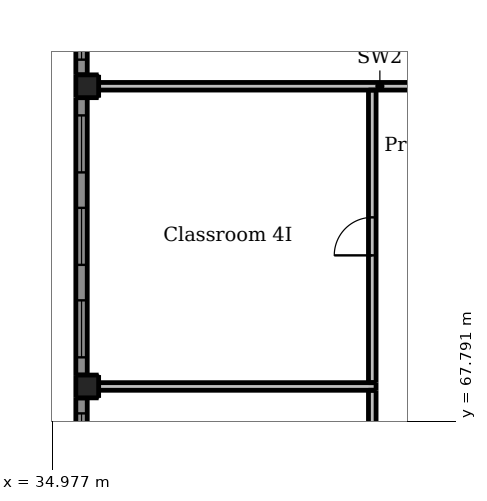
"""IFC4 building model, lengths in metres.
Left out: names, types, materials, properties, quantities, classifications, styles, units other than length and angle.
Written with IfcOpenShell. Run it as: python <this file> out.ifc"""

import sys

from ifc_helpers import new_model, si_unit, direction, frame, frame_2d, origin, origin_2d, place, context, subcontext, project, spatial, rectangle, extrude, element, fill, save


model = new_model("IFC4")
c1 = context("Model", 3, precision=1e-05, world=origin(), true_north=direction((0.0, 1.0)))
c2 = subcontext(c1, "Body", "Model", "MODEL_VIEW")
j1 = project(units=[si_unit("LENGTHUNIT", "METRE"), si_unit("PLANEANGLEUNIT", "RADIAN")], contexts=[c1])
p1 = place(None, origin())
s1 = spatial("IfcSite", under=j1, at=p1, CompositionType="ELEMENT")
p2 = place(p1, origin())
s2 = spatial("IfcBuilding", under=s1, at=p2, CompositionType="ELEMENT")
p3 = place(p2, frame((0.0, 0.0, 19.0)))
s3 = spatial("IfcBuildingStorey", under=s2, at=p3, CompositionType="ELEMENT", Elevation=19.0)
for number, where, z_axis, x_axis in (
    (1, (35.9, 68.7, -0.3), (0.0, 0.0, 1.0), (1.0, 0.0, 0.0)),
    (2, (35.9, 76.6, -0.3), (0.0, 0.0, 1.0), (1.0, 0.0, 0.0)),
):
    element("IfcColumn", number, at=place(p3, frame(where, z_axis=z_axis, x_axis=x_axis)), inside=s3, PredefinedType="COLUMN", context=c2, shape_type="SweptSolid", body=[
        extrude(rectangle(XDim=0.6, YDim=0.6, at=origin_2d()), origin(), (0.0, 0.0, 1.0), 4.35),
    ])
p4 = place(p3, frame((35.75, 61.45, 0.0), z_axis=(0.0, 0.0, 1.0), x_axis=(0.0, 1.0, 0.0)))
e3 = element("IfcWall", 3, at=p4, inside=s3, PredefinedType="SOLIDWALL", context=c2, shape_type="SweptSolid", body=[
    extrude(rectangle(XDim=6.95, YDim=0.3, at=frame_2d((3.475, 0.0))), origin(), (0.0, 0.0, 1.0), 3.15),
])
p5 = place(p4, frame((0.408, 0.0, 0.9)))
e4 = element("IfcOpeningElement", 4, at=p5, cuts=e3, PredefinedType="OPENING", context=c2, shape_type="SweptSolid", body=[
    extrude(rectangle(XDim=1.5, YDim=1.5, at=frame_2d((0.75, 0.75))), frame((0.0, 0.16, 0.0), z_axis=(0.0, -1.0, 0.0), x_axis=(1.0, 0.0, 0.0)), (0.0, 0.0, 1.0), 0.32),
])
p6 = place(p4, frame((2.725, 0.0, 0.9)))
e5 = element("IfcOpeningElement", 5, at=p6, cuts=e3, PredefinedType="OPENING", context=c2, shape_type="SweptSolid", body=[
    extrude(rectangle(XDim=1.5, YDim=1.5, at=frame_2d((0.75, 0.75))), frame((0.0, 0.16, 0.0), z_axis=(0.0, -1.0, 0.0), x_axis=(1.0, 0.0, 0.0)), (0.0, 0.0, 1.0), 0.32),
])
p7 = place(p4, frame((5.042, 0.0, 0.9)))
e6 = element("IfcOpeningElement", 6, at=p7, cuts=e3, PredefinedType="OPENING", context=c2, shape_type="SweptSolid", body=[
    extrude(rectangle(XDim=1.5, YDim=1.5, at=frame_2d((0.75, 0.75))), frame((0.0, 0.16, 0.0), z_axis=(0.0, -1.0, 0.0), x_axis=(1.0, 0.0, 0.0)), (0.0, 0.0, 1.0), 0.32),
])
p8 = place(p3, frame((35.75, 69.0, 0.0), z_axis=(0.0, 0.0, 1.0), x_axis=(0.0, 1.0, 0.0)))
e7 = element("IfcWall", 7, at=p8, inside=s3, PredefinedType="SOLIDWALL", context=c2, shape_type="SweptSolid", body=[
    extrude(rectangle(XDim=7.3, YDim=0.3, at=frame_2d((3.65, 0.0))), origin(), (0.0, 0.0, 1.0), 3.15),
])
p9 = place(p8, frame((0.467, 0.0, 0.9)))
e8 = element("IfcOpeningElement", 8, at=p9, cuts=e7, PredefinedType="OPENING", context=c2, shape_type="SweptSolid", body=[
    extrude(rectangle(XDim=1.5, YDim=1.5, at=frame_2d((0.75, 0.75))), frame((0.0, 0.16, 0.0), z_axis=(0.0, -1.0, 0.0), x_axis=(1.0, 0.0, 0.0)), (0.0, 0.0, 1.0), 0.32),
])
p10 = place(p8, frame((2.9, 0.0, 0.9)))
e9 = element("IfcOpeningElement", 9, at=p10, cuts=e7, PredefinedType="OPENING", context=c2, shape_type="SweptSolid", body=[
    extrude(rectangle(XDim=1.5, YDim=1.5, at=frame_2d((0.75, 0.75))), frame((0.0, 0.16, 0.0), z_axis=(0.0, -1.0, 0.0), x_axis=(1.0, 0.0, 0.0)), (0.0, 0.0, 1.0), 0.32),
])
p11 = place(p8, frame((5.333, 0.0, 0.9)))
e10 = element("IfcOpeningElement", 10, at=p11, cuts=e7, PredefinedType="OPENING", context=c2, shape_type="SweptSolid", body=[
    extrude(rectangle(XDim=1.5, YDim=1.5, at=frame_2d((0.75, 0.75))), frame((0.0, 0.16, 0.0), z_axis=(0.0, -1.0, 0.0), x_axis=(1.0, 0.0, 0.0)), (0.0, 0.0, 1.0), 0.32),
])
p12 = place(p3, frame((35.75, 76.9, 0.0), z_axis=(0.0, 0.0, 1.0), x_axis=(0.0, 1.0, 0.0)))
e11 = element("IfcWall", 11, at=p12, inside=s3, PredefinedType="SOLIDWALL", context=c2, shape_type="SweptSolid", body=[
    extrude(rectangle(XDim=6.9, YDim=0.3, at=frame_2d((3.45, 0.0))), origin(), (0.0, 0.0, 1.0), 3.15),
])
p13 = place(p12, frame((0.4, 0.0, 0.9)))
e12 = element("IfcOpeningElement", 12, at=p13, cuts=e11, PredefinedType="OPENING", context=c2, shape_type="SweptSolid", body=[
    extrude(rectangle(XDim=1.5, YDim=1.5, at=frame_2d((0.75, 0.75))), frame((0.0, 0.16, 0.0), z_axis=(0.0, -1.0, 0.0), x_axis=(1.0, 0.0, 0.0)), (0.0, 0.0, 1.0), 0.32),
])
p14 = place(p12, frame((2.7, 0.0, 0.9)))
e13 = element("IfcOpeningElement", 13, at=p14, cuts=e11, PredefinedType="OPENING", context=c2, shape_type="SweptSolid", body=[
    extrude(rectangle(XDim=1.5, YDim=1.5, at=frame_2d((0.75, 0.75))), frame((0.0, 0.16, 0.0), z_axis=(0.0, -1.0, 0.0), x_axis=(1.0, 0.0, 0.0)), (0.0, 0.0, 1.0), 0.32),
])
p15 = place(p12, frame((5.0, 0.0, 0.9)))
e14 = element("IfcOpeningElement", 14, at=p15, cuts=e11, PredefinedType="OPENING", context=c2, shape_type="SweptSolid", body=[
    extrude(rectangle(XDim=1.5, YDim=1.5, at=frame_2d((0.75, 0.75))), frame((0.0, 0.16, 0.0), z_axis=(0.0, -1.0, 0.0), x_axis=(1.0, 0.0, 0.0)), (0.0, 0.0, 1.0), 0.32),
])
p16 = place(p3, frame((43.4, 61.25, 0.0), z_axis=(0.0, 0.0, 1.0), x_axis=(0.0, 1.0, 0.0)))
e15 = element("IfcWall", 15, at=p16, inside=s3, PredefinedType="PARTITIONING", context=c2, shape_type="SweptSolid", body=[
    extrude(rectangle(XDim=7.35, YDim=0.2, at=frame_2d((3.675, 0.0))), origin(), (0.0, 0.0, 1.0), 2.85),
])
p17 = place(p16, frame((3.175, 0.0, 0.0)))
e16 = element("IfcOpeningElement", 16, at=p17, cuts=e15, PredefinedType="OPENING", context=c2, shape_type="SweptSolid", body=[
    extrude(rectangle(XDim=1.0, YDim=2.1, at=frame_2d((0.5, 1.05))), frame((0.0, 0.11, 0.0), z_axis=(0.0, -1.0, 0.0), x_axis=(1.0, 0.0, 0.0)), (0.0, 0.0, 1.0), 0.22),
])
p18 = place(p3, frame((43.4, 68.8, 0.0), z_axis=(0.0, 0.0, 1.0), x_axis=(0.0, 1.0, 0.0)))
e17 = element("IfcWall", 17, at=p18, inside=s3, PredefinedType="PARTITIONING", context=c2, shape_type="SweptSolid", body=[
    extrude(rectangle(XDim=7.7, YDim=0.2, at=frame_2d((3.85, 0.0))), origin(), (0.0, 0.0, 1.0), 2.85),
])
p19 = place(p18, frame((3.35, 0.0, 0.0)))
e18 = element("IfcOpeningElement", 18, at=p19, cuts=e17, PredefinedType="OPENING", context=c2, shape_type="SweptSolid", body=[
    extrude(rectangle(XDim=1.0, YDim=2.1, at=frame_2d((0.5, 1.05))), frame((0.0, 0.11, 0.0), z_axis=(0.0, -1.0, 0.0), x_axis=(1.0, 0.0, 0.0)), (0.0, 0.0, 1.0), 0.22),
])
p20 = place(p3, frame((36.2, 68.7, 0.0), z_axis=(0.0, 0.0, 1.0), x_axis=(1.0, 0.0, 0.0)))
e19 = element("IfcWall", 19, at=p20, inside=s3, PredefinedType="PARTITIONING", context=c2, shape_type="SweptSolid", body=[
    extrude(rectangle(XDim=7.3, YDim=0.2, at=frame_2d((3.65, 0.0))), origin(), (0.0, 0.0, 1.0), 2.85),
])
p21 = place(p3, frame((36.2, 76.6, 0.0), z_axis=(0.0, 0.0, 1.0), x_axis=(1.0, 0.0, 0.0)))
e20 = element("IfcWall", 20, at=p21, inside=s3, PredefinedType="PARTITIONING", context=c2, shape_type="SweptSolid", body=[
    extrude(rectangle(XDim=14.8, YDim=0.2, at=frame_2d((7.4, 0.0))), origin(), (0.0, 0.0, 1.0), 2.85),
])
p22 = place(p21, frame((11.1, 0.0, 0.0)))
e21 = element("IfcOpeningElement", 21, at=p22, cuts=e20, PredefinedType="OPENING", context=c2, shape_type="SweptSolid", body=[
    extrude(rectangle(XDim=1.0, YDim=2.1, at=frame_2d((0.5, 1.05))), frame((0.0, 0.11, 0.0), z_axis=(0.0, -1.0, 0.0), x_axis=(1.0, 0.0, 0.0)), (0.0, 0.0, 1.0), 0.22),
])
p23 = place(p7, origin())
e22 = element("IfcWindow", 22, at=p23, inside=s3, PartitioningType="DOUBLE_PANEL_HORIZONTAL", PredefinedType="WINDOW", context=c2, shape_type="SweptSolid", body=[
    extrude(rectangle(XDim=1.5, YDim=1.5, at=frame_2d((0.75, 0.75))), frame((0.0, 0.03, 0.0), z_axis=(0.0, -1.0, 0.0), x_axis=(1.0, 0.0, 0.0)), (0.0, 0.0, 1.0), 0.06),
])
fill(e6, e22)
p24 = place(p9, origin())
e23 = element("IfcWindow", 23, at=p24, inside=s3, PartitioningType="DOUBLE_PANEL_HORIZONTAL", PredefinedType="WINDOW", context=c2, shape_type="SweptSolid", body=[
    extrude(rectangle(XDim=1.5, YDim=1.5, at=frame_2d((0.75, 0.75))), frame((0.0, 0.03, 0.0), z_axis=(0.0, -1.0, 0.0), x_axis=(1.0, 0.0, 0.0)), (0.0, 0.0, 1.0), 0.06),
])
fill(e8, e23)
p25 = place(p10, origin())
e24 = element("IfcWindow", 24, at=p25, inside=s3, PartitioningType="DOUBLE_PANEL_HORIZONTAL", PredefinedType="WINDOW", context=c2, shape_type="SweptSolid", body=[
    extrude(rectangle(XDim=1.5, YDim=1.5, at=frame_2d((0.75, 0.75))), frame((0.0, 0.03, 0.0), z_axis=(0.0, -1.0, 0.0), x_axis=(1.0, 0.0, 0.0)), (0.0, 0.0, 1.0), 0.06),
])
fill(e9, e24)
p26 = place(p11, origin())
e25 = element("IfcWindow", 25, at=p26, inside=s3, PartitioningType="DOUBLE_PANEL_HORIZONTAL", PredefinedType="WINDOW", context=c2, shape_type="SweptSolid", body=[
    extrude(rectangle(XDim=1.5, YDim=1.5, at=frame_2d((0.75, 0.75))), frame((0.0, 0.03, 0.0), z_axis=(0.0, -1.0, 0.0), x_axis=(1.0, 0.0, 0.0)), (0.0, 0.0, 1.0), 0.06),
])
fill(e10, e25)
p27 = place(p13, origin())
e26 = element("IfcWindow", 26, at=p27, inside=s3, PartitioningType="DOUBLE_PANEL_HORIZONTAL", PredefinedType="WINDOW", context=c2, shape_type="SweptSolid", body=[
    extrude(rectangle(XDim=1.5, YDim=1.5, at=frame_2d((0.75, 0.75))), frame((0.0, 0.03, 0.0), z_axis=(0.0, -1.0, 0.0), x_axis=(1.0, 0.0, 0.0)), (0.0, 0.0, 1.0), 0.06),
])
fill(e12, e26)
p28 = place(p19, origin())
e27 = element("IfcDoor", 27, at=p28, inside=s3, OperationType="SINGLE_SWING_LEFT", PredefinedType="DOOR", context=c2, shape_type="SweptSolid", body=[
    extrude(rectangle(XDim=1.0, YDim=2.1, at=frame_2d((0.5, 1.05))), frame((0.0, 0.025, 0.0), z_axis=(0.0, -1.0, 0.0), x_axis=(1.0, 0.0, 0.0)), (0.0, 0.0, 1.0), 0.05),
])
fill(e18, e27)
save(model, sys.argv[1])
